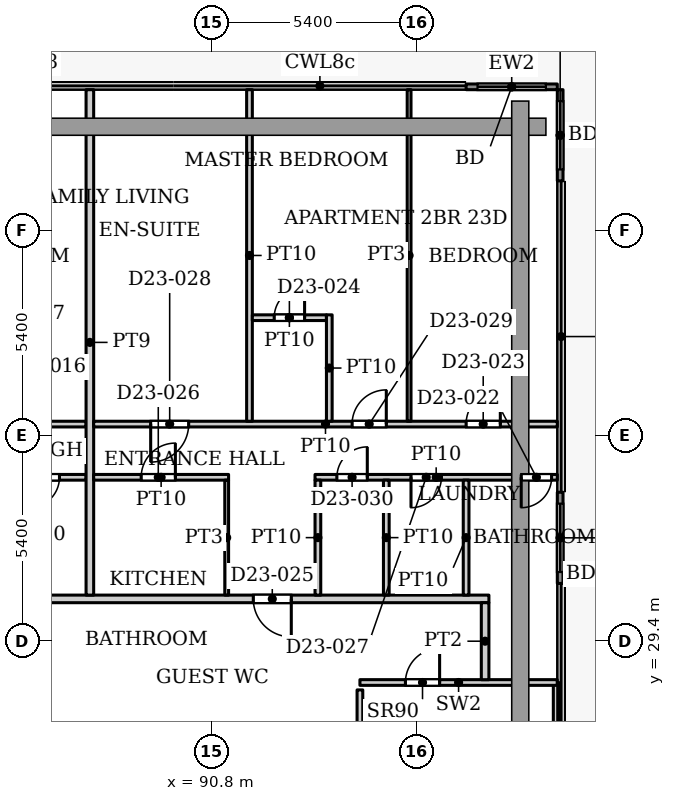
"""IFC4 building model, lengths in metres.
Left out: names, types, materials, properties, quantities, classifications, styles, units other than length and angle.
Written with IfcOpenShell. Run it as: python <this file> out.ifc"""

import sys

from ifc_helpers import new_model, si_unit, direction, frame, frame_2d, origin, place, context, subcontext, project, spatial, rectangle, extrude, source, transform, mapped, element, fill, save


model = new_model("IFC4")
c1 = context("Model", 3, precision=1e-05, world=origin(), true_north=direction((0.0, 1.0)))
c2 = subcontext(c1, "Body", "Model", "MODEL_VIEW")
j1 = project(units=[si_unit("LENGTHUNIT", "METRE"), si_unit("PLANEANGLEUNIT", "RADIAN")], contexts=[c1])
p1 = place(None, origin())
s1 = spatial("IfcSite", under=j1, at=p1, CompositionType="ELEMENT")
p2 = place(p1, origin())
s2 = spatial("IfcBuilding", under=s1, at=p2, CompositionType="ELEMENT")
p3 = place(p2, frame((0.0, 0.0, 101.9)))
s3 = spatial("IfcBuildingStorey", under=s2, at=p3, CompositionType="ELEMENT", Elevation=101.9)
p4 = place(p3, frame((97.5, 43.975, 0.0), z_axis=(0.0, 0.0, 1.0), x_axis=(1.0, 0.0, 0.0)))
e1 = element("IfcWall", 1, at=p4, inside=s3, PredefinedType="SOLIDWALL", context=c2, shape_type="SweptSolid", body=[
    extrude(rectangle(XDim=2.4, YDim=0.15, at=frame_2d((1.2, 0.0))), origin(), (0.0, 0.0, 1.0), 3.75),
])
p5 = place(p4, frame((0.3, 0.0, 0.0)))
e2 = element("IfcOpeningElement", 2, at=p5, cuts=e1, PredefinedType="OPENING", context=c2, shape_type="SweptSolid", body=[
    extrude(rectangle(XDim=1.8, YDim=2.4, at=frame_2d((0.9, 1.2))), frame((0.0, 0.085, 0.0), z_axis=(0.0, -1.0, 0.0), x_axis=(1.0, 0.0, 0.0)), (0.0, 0.0, 1.0), 0.17),
])
p6 = place(p3, frame((99.975, 43.9, 0.0), z_axis=(0.0, 0.0, 1.0), x_axis=(0.0, -1.0, 0.0)))
e3 = element("IfcWall", 3, at=p6, inside=s3, PredefinedType="SOLIDWALL", context=c2, shape_type="SweptSolid", body=[
    extrude(rectangle(XDim=2.4, YDim=0.15, at=frame_2d((1.2, 0.0))), origin(), (0.0, 0.0, 1.0), 3.75),
])
p7 = place(p6, frame((0.3, 0.0, 0.0)))
e4 = element("IfcOpeningElement", 4, at=p7, cuts=e3, PredefinedType="OPENING", context=c2, shape_type="SweptSolid", body=[
    extrude(rectangle(XDim=1.8, YDim=2.4, at=frame_2d((0.9, 1.2))), frame((0.0, 0.085, 0.0), z_axis=(0.0, -1.0, 0.0), x_axis=(1.0, 0.0, 0.0)), (0.0, 0.0, 1.0), 0.17),
])
p8 = place(p3, frame((99.975, 33.307, 0.0), z_axis=(0.0, 0.0, 1.0), x_axis=(0.0, -1.0, 0.0)))
e5 = element("IfcWall", 5, at=p8, inside=s3, PredefinedType="SOLIDWALL", context=c2, shape_type="SweptSolid", body=[
    extrude(rectangle(XDim=2.4, YDim=0.15, at=frame_2d((1.2, 0.0))), origin(), (0.0, 0.0, 1.0), 3.75),
])
p9 = place(p8, frame((0.3, 0.0, 0.0)))
e6 = element("IfcOpeningElement", 6, at=p9, cuts=e5, PredefinedType="OPENING", context=c2, shape_type="SweptSolid", body=[
    extrude(rectangle(XDim=1.8, YDim=2.4, at=frame_2d((0.9, 1.2))), frame((0.0, 0.085, 0.0), z_axis=(0.0, -1.0, 0.0), x_axis=(1.0, 0.0, 0.0)), (0.0, 0.0, 1.0), 0.17),
])
p10 = place(p3, frame((99.87, 21.015, 0.0), z_axis=(0.0, 0.0, 1.0), x_axis=(0.0, 1.0, 0.0)))
e7 = element("IfcWall", 7, at=p10, inside=s3, PredefinedType="PARTITIONING", context=c2, shape_type="SweptSolid", body=[
    extrude(rectangle(XDim=7.285, YDim=0.15, at=frame_2d((3.643, 0.0))), origin(), (0.0, 0.0, 1.0), 3.9),
])
p11 = place(p3, frame((94.706, 28.3, 0.0), z_axis=(0.0, 0.0, 1.0), x_axis=(1.0, 0.0, 0.0)))
e8 = element("IfcWall", 8, at=p11, inside=s3, PredefinedType="PARTITIONING", context=c2, shape_type="SweptSolid", body=[
    extrude(rectangle(XDim=5.192, YDim=0.15, at=frame_2d((2.596, 0.0))), origin(), (0.0, 0.0, 1.0), 3.9),
])
p12 = place(p11, frame((1.197, 0.0, 0.0)))
e9 = element("IfcOpeningElement", 9, at=p12, cuts=e8, PredefinedType="OPENING", context=c2, shape_type="SweptSolid", body=[
    extrude(rectangle(XDim=0.9, YDim=2.2, at=frame_2d((0.45, 1.1))), frame((0.0, 0.085, 0.0), z_axis=(0.0, -1.0, 0.0), x_axis=(1.0, 0.0, 0.0)), (0.0, 0.0, 1.0), 0.17),
])
p13 = place(p3, frame((94.706, 21.287, 0.0), z_axis=(0.0, 0.0, 1.0), x_axis=(0.0, 1.0, 0.0)))
e10 = element("IfcWall", 10, at=p13, inside=s3, PredefinedType="PARTITIONING", context=c2, shape_type="SweptSolid", body=[
    extrude(rectangle(XDim=6.818, YDim=0.15, at=frame_2d((3.409, 0.0))), origin(), (0.0, 0.0, 1.0), 3.9),
])
p14 = place(p3, frame((55.9, 30.5, 0.0), z_axis=(0.0, 0.0, 1.0), x_axis=(1.0, 0.0, 0.0)))
e11 = element("IfcWall", 11, at=p14, inside=s3, PredefinedType="PARTITIONING", context=c2, shape_type="SweptSolid", body=[
    extrude(rectangle(XDim=42.2, YDim=0.2, at=frame_2d((21.1, 0.0))), origin(), (0.0, 0.0, 1.0), 3.6),
])
p15 = place(p14, frame((10.35, 0.0, 0.0)))
e12 = element("IfcOpeningElement", 12, at=p15, cuts=e11, PredefinedType="OPENING", context=c2, shape_type="SweptSolid", body=[
    extrude(rectangle(XDim=1.0, YDim=2.1, at=frame_2d((0.5, 1.05))), frame((0.0, 0.11, 0.0), z_axis=(0.0, -1.0, 0.0), x_axis=(1.0, 0.0, 0.0)), (0.0, 0.0, 1.0), 0.22),
])
p16 = place(p14, frame((16.65, 0.0, 0.0)))
e13 = element("IfcOpeningElement", 13, at=p16, cuts=e11, PredefinedType="OPENING", context=c2, shape_type="SweptSolid", body=[
    extrude(rectangle(XDim=1.0, YDim=2.1, at=frame_2d((0.5, 1.05))), frame((0.0, 0.11, 0.0), z_axis=(0.0, -1.0, 0.0), x_axis=(1.0, 0.0, 0.0)), (0.0, 0.0, 1.0), 0.22),
])
p17 = place(p14, frame((27.6, 0.0, 0.0)))
e14 = element("IfcOpeningElement", 14, at=p17, cuts=e11, PredefinedType="OPENING", context=c2, shape_type="SweptSolid", body=[
    extrude(rectangle(XDim=1.0, YDim=2.1, at=frame_2d((0.5, 1.05))), frame((0.0, 0.11, 0.0), z_axis=(0.0, -1.0, 0.0), x_axis=(1.0, 0.0, 0.0)), (0.0, 0.0, 1.0), 0.22),
])
p18 = place(p14, frame((36.0, 0.0, 0.0)))
e15 = element("IfcOpeningElement", 15, at=p18, cuts=e11, PredefinedType="OPENING", context=c2, shape_type="SweptSolid", body=[
    extrude(rectangle(XDim=1.0, YDim=2.1, at=frame_2d((0.5, 1.05))), frame((0.0, 0.11, 0.0), z_axis=(0.0, -1.0, 0.0), x_axis=(1.0, 0.0, 0.0)), (0.0, 0.0, 1.0), 0.22),
])
p19 = place(p3, frame((77.5, 35.1, 0.0), z_axis=(0.0, 0.0, 1.0), x_axis=(1.0, 0.0, 0.0)))
e16 = element("IfcWall", 16, at=p19, inside=s3, PredefinedType="PARTITIONING", context=c2, shape_type="SweptSolid", body=[
    extrude(rectangle(XDim=10.0, YDim=0.15, at=frame_2d((5.0, 0.0))), origin(), (0.0, 0.0, 1.0), 3.6),
])
p20 = place(p19, frame((7.9, 0.0, 0.0)))
e17 = element("IfcOpeningElement", 17, at=p20, cuts=e16, PredefinedType="OPENING", context=c2, shape_type="SweptSolid", body=[
    extrude(rectangle(XDim=0.9, YDim=2.1, at=frame_2d((0.45, 1.05))), frame((0.0, 0.085, 0.0), z_axis=(0.0, -1.0, 0.0), x_axis=(1.0, 0.0, 0.0)), (0.0, 0.0, 1.0), 0.17),
])
p21 = place(p19, frame((2.55, 0.0, 0.0)))
e18 = element("IfcOpeningElement", 18, at=p21, cuts=e16, PredefinedType="OPENING", context=c2, shape_type="SweptSolid", body=[
    extrude(rectangle(XDim=1.0, YDim=2.1, at=frame_2d((0.5, 1.05))), frame((0.0, 0.085, 0.0), z_axis=(0.0, -1.0, 0.0), x_axis=(1.0, 0.0, 0.0)), (0.0, 0.0, 1.0), 0.17),
])
p22 = place(p3, frame((85.275, 33.7, 0.0), z_axis=(0.0, 0.0, 1.0), x_axis=(1.0, 0.0, 0.0)))
e19 = element("IfcWall", 19, at=p22, inside=s3, PredefinedType="PARTITIONING", context=c2, shape_type="SweptSolid", body=[
    extrude(rectangle(XDim=2.225, YDim=0.15, at=frame_2d((1.113, 0.0))), origin(), (0.0, 0.0, 1.0), 3.6),
])
p23 = place(p22, frame((0.725, 0.0, 0.0)))
e20 = element("IfcOpeningElement", 20, at=p23, cuts=e19, PredefinedType="OPENING", context=c2, shape_type="SweptSolid", body=[
    extrude(rectangle(XDim=0.8, YDim=2.1, at=frame_2d((0.4, 1.05))), frame((0.0, 0.085, 0.0), z_axis=(0.0, -1.0, 0.0), x_axis=(1.0, 0.0, 0.0)), (0.0, 0.0, 1.0), 0.17),
])
p24 = place(p3, frame((87.6, 30.6, 0.0), z_axis=(0.0, 0.0, 1.0), x_axis=(0.0, 1.0, 0.0)))
e21 = element("IfcWall", 21, at=p24, inside=s3, PredefinedType="PARTITIONING", context=c2, shape_type="SweptSolid", body=[
    extrude(rectangle(XDim=13.3, YDim=0.2, at=frame_2d((6.65, 0.0))), origin(), (0.0, 0.0, 1.0), 3.6),
])
p25 = place(p3, frame((87.7, 33.7, 0.0), z_axis=(0.0, 0.0, 1.0), x_axis=(1.0, 0.0, 0.0)))
e22 = element("IfcWall", 22, at=p25, inside=s3, PredefinedType="PARTITIONING", context=c2, shape_type="SweptSolid", body=[
    extrude(rectangle(XDim=3.55, YDim=0.15, at=frame_2d((1.775, 0.0))), origin(), (0.0, 0.0, 1.0), 3.6),
])
p26 = place(p25, frame((1.25, 0.0, 0.0)))
e23 = element("IfcOpeningElement", 23, at=p26, cuts=e22, PredefinedType="OPENING", context=c2, shape_type="SweptSolid", body=[
    extrude(rectangle(XDim=0.9, YDim=2.1, at=frame_2d((0.45, 1.05))), frame((0.0, 0.085, 0.0), z_axis=(0.0, -1.0, 0.0), x_axis=(1.0, 0.0, 0.0)), (0.0, 0.0, 1.0), 0.17),
])
p27 = place(p3, frame((87.7, 35.1, 0.0), z_axis=(0.0, 0.0, 1.0), x_axis=(1.0, 0.0, 0.0)))
e24 = element("IfcWall", 24, at=p27, inside=s3, PredefinedType="PARTITIONING", context=c2, shape_type="SweptSolid", body=[
    extrude(rectangle(XDim=12.2, YDim=0.15, at=frame_2d((6.1, 0.0))), origin(), (0.0, 0.0, 1.0), 3.6),
])
p28 = place(p27, frame((9.8, 0.0, 0.0)))
e25 = element("IfcOpeningElement", 25, at=p28, cuts=e24, PredefinedType="OPENING", context=c2, shape_type="SweptSolid", body=[
    extrude(rectangle(XDim=0.9, YDim=2.1, at=frame_2d((0.45, 1.05))), frame((0.0, 0.085, 0.0), z_axis=(0.0, -1.0, 0.0), x_axis=(1.0, 0.0, 0.0)), (0.0, 0.0, 1.0), 0.17),
])
p29 = place(p27, frame((1.5, 0.0, 0.0)))
e26 = element("IfcOpeningElement", 26, at=p29, cuts=e24, PredefinedType="OPENING", context=c2, shape_type="SweptSolid", body=[
    extrude(rectangle(XDim=1.0, YDim=2.1, at=frame_2d((0.5, 1.05))), frame((0.0, 0.085, 0.0), z_axis=(0.0, -1.0, 0.0), x_axis=(1.0, 0.0, 0.0)), (0.0, 0.0, 1.0), 0.17),
])
p30 = place(p27, frame((6.8, 0.0, 0.0)))
e27 = element("IfcOpeningElement", 27, at=p30, cuts=e24, PredefinedType="OPENING", context=c2, shape_type="SweptSolid", body=[
    extrude(rectangle(XDim=0.9, YDim=2.1, at=frame_2d((0.45, 1.05))), frame((0.0, 0.085, 0.0), z_axis=(0.0, -1.0, 0.0), x_axis=(1.0, 0.0, 0.0)), (0.0, 0.0, 1.0), 0.17),
])
p31 = place(p3, frame((91.2, 30.6, 0.0), z_axis=(0.0, 0.0, 1.0), x_axis=(0.0, 1.0, 0.0)))
e28 = element("IfcWall", 28, at=p31, inside=s3, PredefinedType="PARTITIONING", context=c2, shape_type="SweptSolid", body=[
    extrude(rectangle(XDim=3.025, YDim=0.1, at=frame_2d((1.512, 0.0))), origin(), (0.0, 0.0, 1.0), 3.6),
])
p32 = place(p3, frame((91.8, 35.175, 0.0), z_axis=(0.0, 0.0, 1.0), x_axis=(0.0, 1.0, 0.0)))
e29 = element("IfcWall", 29, at=p32, inside=s3, PredefinedType="PARTITIONING", context=c2, shape_type="SweptSolid", body=[
    extrude(rectangle(XDim=8.725, YDim=0.15, at=frame_2d((4.362, 0.0))), origin(), (0.0, 0.0, 1.0), 3.6),
])
p33 = place(p3, frame((91.875, 37.9, 0.0), z_axis=(0.0, 0.0, 1.0), x_axis=(1.0, 0.0, 0.0)))
e30 = element("IfcWall", 30, at=p33, inside=s3, PredefinedType="PARTITIONING", context=c2, shape_type="SweptSolid", body=[
    extrude(rectangle(XDim=1.95, YDim=0.15, at=frame_2d((0.975, 0.0))), origin(), (0.0, 0.0, 1.0), 3.6),
])
p34 = place(p33, frame((0.575, 0.0, 0.0)))
e31 = element("IfcOpeningElement", 31, at=p34, cuts=e30, PredefinedType="OPENING", context=c2, shape_type="SweptSolid", body=[
    extrude(rectangle(XDim=0.8, YDim=2.1, at=frame_2d((0.4, 1.05))), frame((0.0, 0.085, 0.0), z_axis=(0.0, -1.0, 0.0), x_axis=(1.0, 0.0, 0.0)), (0.0, 0.0, 1.0), 0.17),
])
p35 = place(p3, frame((93.525, 33.7, 0.0), z_axis=(0.0, 0.0, 1.0), x_axis=(1.0, 0.0, 0.0)))
e32 = element("IfcWall", 32, at=p35, inside=s3, PredefinedType="PARTITIONING", context=c2, shape_type="SweptSolid", body=[
    extrude(rectangle(XDim=6.375, YDim=0.15, at=frame_2d((3.188, 0.0))), origin(), (0.0, 0.0, 1.0), 3.6),
])
p36 = place(p35, frame((5.425, 0.0, 0.0)))
e33 = element("IfcOpeningElement", 33, at=p36, cuts=e32, PredefinedType="OPENING", context=c2, shape_type="SweptSolid", body=[
    extrude(rectangle(XDim=0.8, YDim=2.1, at=frame_2d((0.4, 1.05))), frame((0.0, 0.085, 0.0), z_axis=(0.0, -1.0, 0.0), x_axis=(1.0, 0.0, 0.0)), (0.0, 0.0, 1.0), 0.17),
])
p37 = place(p35, frame((2.525, 0.0, 0.0)))
e34 = element("IfcOpeningElement", 34, at=p37, cuts=e32, PredefinedType="OPENING", context=c2, shape_type="SweptSolid", body=[
    extrude(rectangle(XDim=0.8, YDim=2.1, at=frame_2d((0.4, 1.05))), frame((0.0, 0.085, 0.0), z_axis=(0.0, -1.0, 0.0), x_axis=(1.0, 0.0, 0.0)), (0.0, 0.0, 1.0), 0.17),
])
p38 = place(p35, frame((0.575, 0.0, 0.0)))
e35 = element("IfcOpeningElement", 35, at=p38, cuts=e32, PredefinedType="OPENING", context=c2, shape_type="SweptSolid", body=[
    extrude(rectangle(XDim=0.8, YDim=2.1, at=frame_2d((0.4, 1.05))), frame((0.0, 0.085, 0.0), z_axis=(0.0, -1.0, 0.0), x_axis=(1.0, 0.0, 0.0)), (0.0, 0.0, 1.0), 0.17),
])
p39 = place(p3, frame((93.6, 30.6, 0.0), z_axis=(0.0, 0.0, 1.0), x_axis=(0.0, 1.0, 0.0)))
e36 = element("IfcWall", 36, at=p39, inside=s3, PredefinedType="PARTITIONING", context=c2, shape_type="SweptSolid", body=[
    extrude(rectangle(XDim=3.025, YDim=0.15, at=frame_2d((1.512, 0.0))), origin(), (0.0, 0.0, 1.0), 3.6),
])
p40 = place(p3, frame((93.9, 35.175, 0.0), z_axis=(0.0, 0.0, 1.0), x_axis=(0.0, 1.0, 0.0)))
e37 = element("IfcWall", 37, at=p40, inside=s3, PredefinedType="PARTITIONING", context=c2, shape_type="SweptSolid", body=[
    extrude(rectangle(XDim=2.8, YDim=0.15, at=frame_2d((1.4, 0.0))), origin(), (0.0, 0.0, 1.0), 3.6),
])
p41 = place(p3, frame((95.4, 30.6, 0.0), z_axis=(0.0, 0.0, 1.0), x_axis=(0.0, 1.0, 0.0)))
e38 = element("IfcWall", 38, at=p41, inside=s3, PredefinedType="PARTITIONING", context=c2, shape_type="SweptSolid", body=[
    extrude(rectangle(XDim=3.025, YDim=0.15, at=frame_2d((1.512, 0.0))), origin(), (0.0, 0.0, 1.0), 3.6),
])
p42 = place(p3, frame((96.0, 35.175, 0.0), z_axis=(0.0, 0.0, 1.0), x_axis=(0.0, 1.0, 0.0)))
e39 = element("IfcWall", 39, at=p42, inside=s3, PredefinedType="PARTITIONING", context=c2, shape_type="SweptSolid", body=[
    extrude(rectangle(XDim=8.725, YDim=0.1, at=frame_2d((4.362, 0.0))), origin(), (0.0, 0.0, 1.0), 3.6),
])
p43 = place(p3, frame((97.5, 30.6, 0.0), z_axis=(0.0, 0.0, 1.0), x_axis=(0.0, 1.0, 0.0)))
e40 = element("IfcWall", 40, at=p43, inside=s3, PredefinedType="PARTITIONING", context=c2, shape_type="SweptSolid", body=[
    extrude(rectangle(XDim=3.025, YDim=0.15, at=frame_2d((1.512, 0.0))), origin(), (0.0, 0.0, 1.0), 3.6),
])
p44 = place(p3, frame((98.0, 28.374, 0.0), z_axis=(0.0, 0.0, 1.0), x_axis=(0.0, 1.0, 0.0)))
e41 = element("IfcWall", 41, at=p44, inside=s3, PredefinedType="PARTITIONING", context=c2, shape_type="SweptSolid", body=[
    extrude(rectangle(XDim=2.026, YDim=0.2, at=frame_2d((1.013, 0.0))), origin(), (0.0, 0.0, 1.0), 3.6),
])
m1 = source(origin(), c2, "Body", "SweptSolid", [
    extrude(rectangle(XDim=1.8, YDim=2.4, at=frame_2d((0.9, 1.2))), frame((0.0, 0.025, 0.0), z_axis=(0.0, -1.0, 0.0), x_axis=(1.0, 0.0, 0.0)), (0.0, 0.0, 1.0), 0.05),
])
p45 = place(p5, origin())
e42 = element("IfcDoor", 42, at=p45, inside=s3, OperationType="SLIDING_TO_LEFT", PredefinedType="DOOR", context=c2, shape_type="MappedRepresentation", body=[
    mapped(m1, transform((0.0, 0.0, 0.0), x_axis=(1.0, 0.0, 0.0), y_axis=(0.0, 1.0, 0.0), z_axis=(0.0, 0.0, 1.0), scale=1.0)),
])
fill(e2, e42)
p46 = place(p7, origin())
e43 = element("IfcDoor", 43, at=p46, inside=s3, OperationType="SLIDING_TO_LEFT", PredefinedType="DOOR", context=c2, shape_type="MappedRepresentation", body=[
    mapped(m1, transform((0.0, 0.0, 0.0), x_axis=(1.0, 0.0, 0.0), y_axis=(0.0, 1.0, 0.0), z_axis=(0.0, 0.0, 1.0), scale=1.0)),
])
fill(e4, e43)
p47 = place(p9, origin())
e44 = element("IfcDoor", 44, at=p47, inside=s3, OperationType="SLIDING_TO_LEFT", PredefinedType="DOOR", context=c2, shape_type="MappedRepresentation", body=[
    mapped(m1, transform((0.0, 0.0, 0.0), x_axis=(1.0, 0.0, 0.0), y_axis=(0.0, 1.0, 0.0), z_axis=(0.0, 0.0, 1.0), scale=1.0)),
])
fill(e6, e44)
m2 = source(origin(), c2, "Body", "SweptSolid", [
    extrude(rectangle(XDim=0.9, YDim=2.2, at=frame_2d((0.45, 1.1))), frame((0.0, 0.025, 0.0), z_axis=(0.0, -1.0, 0.0), x_axis=(1.0, 0.0, 0.0)), (0.0, 0.0, 1.0), 0.05),
])
p48 = place(p12, origin())
e45 = element("IfcDoor", 45, at=p48, inside=s3, OperationType="SINGLE_SWING_LEFT", PredefinedType="DOOR", context=c2, shape_type="MappedRepresentation", body=[
    mapped(m2, transform((0.0, 0.0, 0.0), x_axis=(1.0, 0.0, 0.0), y_axis=(0.0, 1.0, 0.0), z_axis=(0.0, 0.0, 1.0), scale=1.0)),
])
fill(e9, e45)
m3 = source(origin(), c2, "Body", "SweptSolid", [
    extrude(rectangle(XDim=0.8, YDim=2.1, at=frame_2d((0.4, 1.05))), frame((0.0, 0.025, 0.0), z_axis=(0.0, -1.0, 0.0), x_axis=(1.0, 0.0, 0.0)), (0.0, 0.0, 1.0), 0.05),
])
p49 = place(p23, origin())
e46 = element("IfcDoor", 46, at=p49, inside=s3, OperationType="SINGLE_SWING_RIGHT", PredefinedType="DOOR", context=c2, shape_type="MappedRepresentation", body=[
    mapped(m3, transform((0.0, 0.0, 0.0), x_axis=(1.0, 0.0, 0.0), y_axis=(0.0, 1.0, 0.0), z_axis=(0.0, 0.0, 1.0), scale=1.0)),
])
fill(e20, e46)
p50 = place(p36, origin())
e47 = element("IfcDoor", 47, at=p50, inside=s3, OperationType="SINGLE_SWING_RIGHT", PredefinedType="DOOR", context=c2, shape_type="MappedRepresentation", body=[
    mapped(m3, transform((0.0, 0.0, 0.0), x_axis=(1.0, 0.0, 0.0), y_axis=(0.0, 1.0, 0.0), z_axis=(0.0, 0.0, 1.0), scale=1.0)),
])
fill(e33, e47)
m4 = source(origin(), c2, "Body", "SweptSolid", [
    extrude(rectangle(XDim=0.9, YDim=2.1, at=frame_2d((0.45, 1.05))), frame((0.0, 0.025, 0.0), z_axis=(0.0, -1.0, 0.0), x_axis=(1.0, 0.0, 0.0)), (0.0, 0.0, 1.0), 0.05),
])
p51 = place(p28, origin())
e48 = element("IfcDoor", 48, at=p51, inside=s3, OperationType="SINGLE_SWING_LEFT", PredefinedType="DOOR", context=c2, shape_type="MappedRepresentation", body=[
    mapped(m4, transform((0.0, 0.0, 0.0), x_axis=(1.0, 0.0, 0.0), y_axis=(0.0, 1.0, 0.0), z_axis=(0.0, 0.0, 1.0), scale=1.0)),
])
fill(e25, e48)
p52 = place(p34, origin())
e49 = element("IfcDoor", 49, at=p52, inside=s3, OperationType="SINGLE_SWING_LEFT", PredefinedType="DOOR", context=c2, shape_type="MappedRepresentation", body=[
    mapped(m3, transform((0.0, 0.0, 0.0), x_axis=(1.0, 0.0, 0.0), y_axis=(0.0, 1.0, 0.0), z_axis=(0.0, 0.0, 1.0), scale=1.0)),
])
fill(e31, e49)
m5 = source(origin(), c2, "Body", "SweptSolid", [
    extrude(rectangle(XDim=1.0, YDim=2.1, at=frame_2d((0.5, 1.05))), frame((0.0, 0.025, 0.0), z_axis=(0.0, -1.0, 0.0), x_axis=(1.0, 0.0, 0.0)), (0.0, 0.0, 1.0), 0.05),
])
p53 = place(p18, origin())
e50 = element("IfcDoor", 50, at=p53, inside=s3, OperationType="SINGLE_SWING_RIGHT", PredefinedType="DOOR", context=c2, shape_type="MappedRepresentation", body=[
    mapped(m5, transform((0.0, 0.0, 0.0), x_axis=(1.0, 0.0, 0.0), y_axis=(0.0, 1.0, 0.0), z_axis=(0.0, 0.0, 1.0), scale=1.0)),
])
fill(e15, e50)
p54 = place(p26, origin())
e51 = element("IfcDoor", 51, at=p54, inside=s3, OperationType="SINGLE_SWING_LEFT", PredefinedType="DOOR", context=c2, shape_type="MappedRepresentation", body=[
    mapped(m4, transform((0.0, 0.0, 0.0), x_axis=(1.0, 0.0, 0.0), y_axis=(0.0, 1.0, 0.0), z_axis=(0.0, 0.0, 1.0), scale=1.0)),
])
fill(e23, e51)
p55 = place(p37, origin())
e52 = element("IfcDoor", 52, at=p55, inside=s3, OperationType="SINGLE_SWING_RIGHT", PredefinedType="DOOR", context=c2, shape_type="MappedRepresentation", body=[
    mapped(m3, transform((0.0, 0.0, 0.0), x_axis=(1.0, 0.0, 0.0), y_axis=(0.0, 1.0, 0.0), z_axis=(0.0, 0.0, 1.0), scale=1.0)),
])
fill(e34, e52)
m6 = source(origin(), c2, "Body", "SweptSolid", [
    extrude(rectangle(XDim=1.0, YDim=2.1, at=frame_2d((0.5, 1.05))), frame((0.0, 0.025, 0.0), z_axis=(0.0, -1.0, 0.0), x_axis=(1.0, 0.0, 0.0)), (0.0, 0.0, 1.0), 0.05),
])
p56 = place(p29, origin())
e53 = element("IfcDoor", 53, at=p56, inside=s3, OperationType="SINGLE_SWING_RIGHT", PredefinedType="DOOR", context=c2, shape_type="MappedRepresentation", body=[
    mapped(m6, transform((0.0, 0.0, 0.0), x_axis=(1.0, 0.0, 0.0), y_axis=(0.0, 1.0, 0.0), z_axis=(0.0, 0.0, 1.0), scale=1.0)),
])
fill(e26, e53)
p57 = place(p30, origin())
e54 = element("IfcDoor", 54, at=p57, inside=s3, OperationType="SINGLE_SWING_LEFT", PredefinedType="DOOR", context=c2, shape_type="MappedRepresentation", body=[
    mapped(m4, transform((0.0, 0.0, 0.0), x_axis=(1.0, 0.0, 0.0), y_axis=(0.0, 1.0, 0.0), z_axis=(0.0, 0.0, 1.0), scale=1.0)),
])
fill(e27, e54)
p58 = place(p38, origin())
e55 = element("IfcDoor", 55, at=p58, inside=s3, OperationType="SINGLE_SWING_LEFT", PredefinedType="DOOR", context=c2, shape_type="MappedRepresentation", body=[
    mapped(m3, transform((0.0, 0.0, 0.0), x_axis=(1.0, 0.0, 0.0), y_axis=(0.0, 1.0, 0.0), z_axis=(0.0, 0.0, 1.0), scale=1.0)),
])
fill(e35, e55)
save(model, sys.argv[1])
